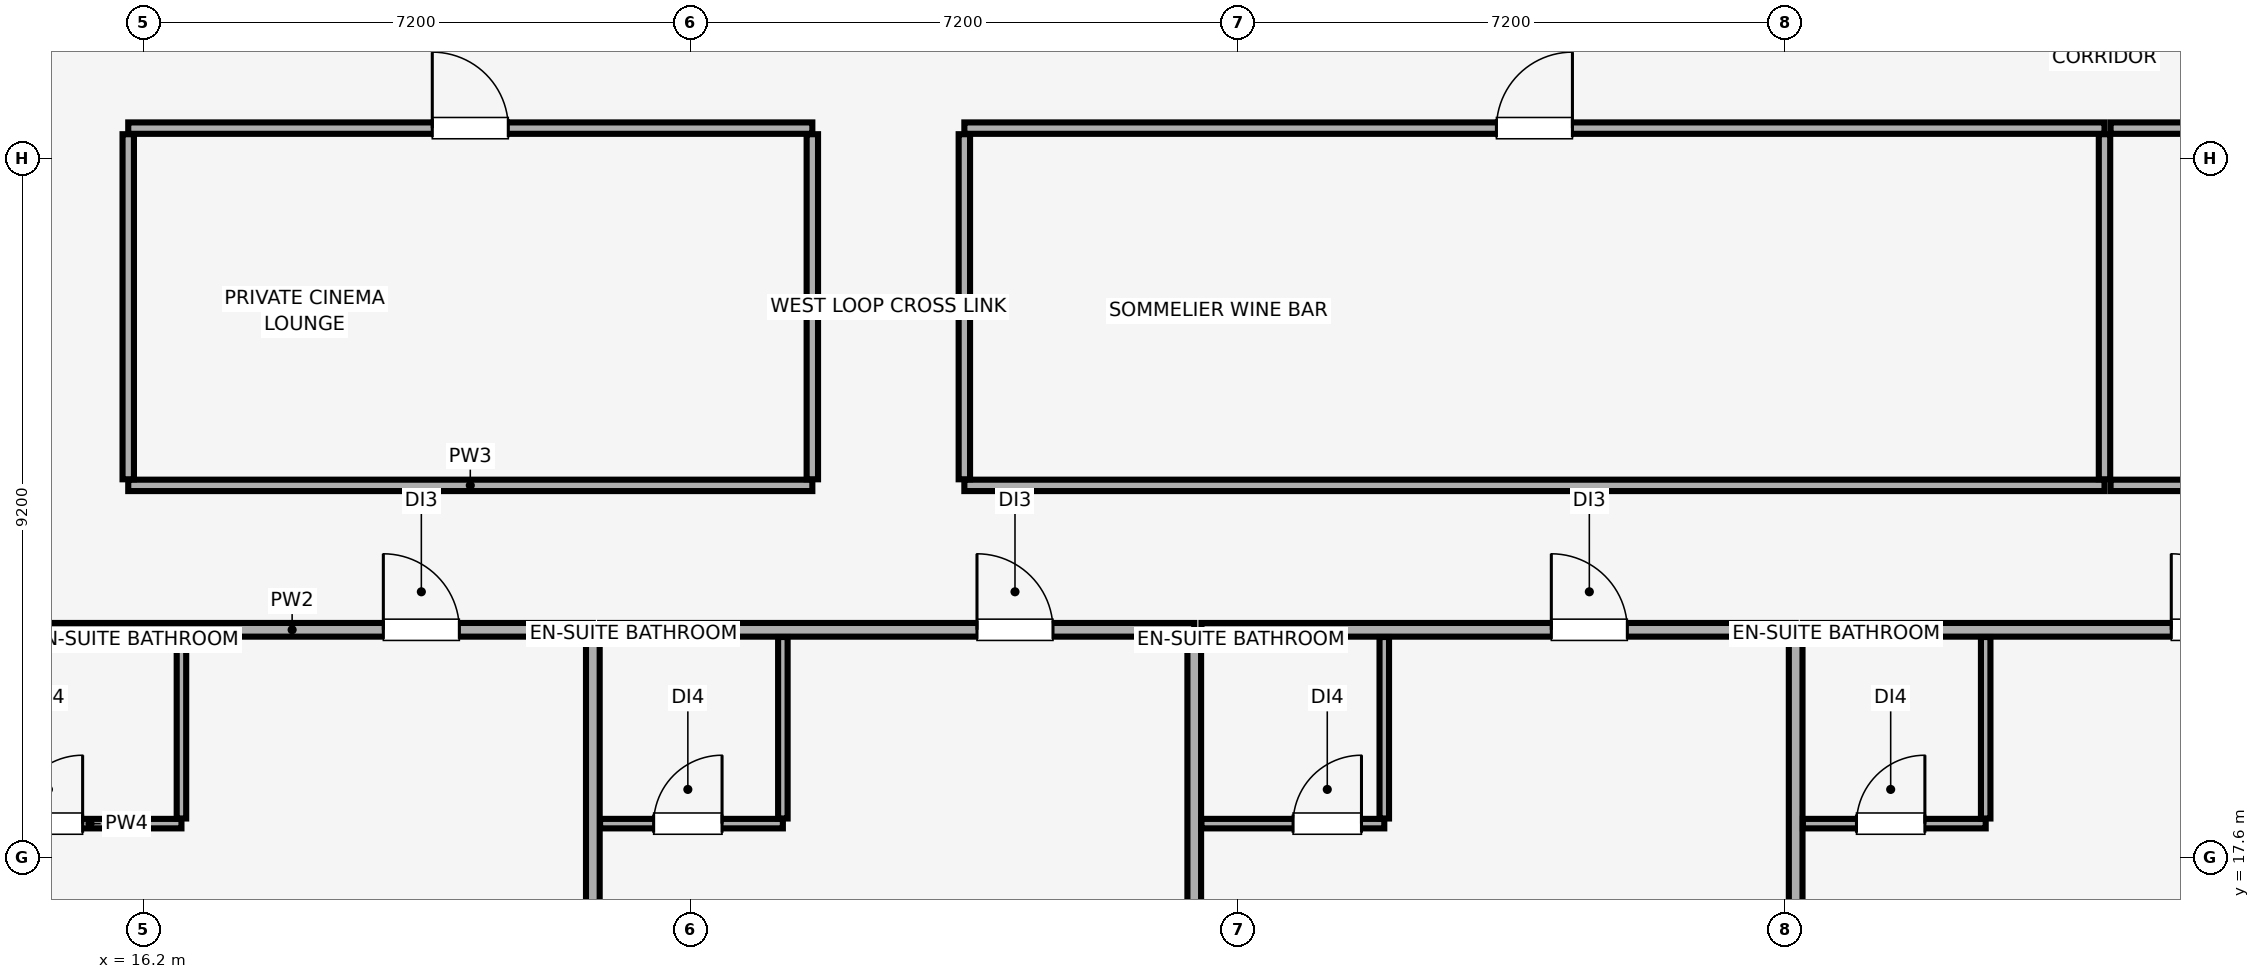
"""IFC4 building model, lengths in metres.
Left out: names, types, materials, properties, quantities, classifications, styles, units other than length and angle.
Written with IfcOpenShell. Run it as: python <this file> out.ifc"""

import sys

from ifc_helpers import new_model, si_unit, direction, frame, frame_2d, origin, place, context, subcontext, project, spatial, rectangle, extrude, element, fill, save


model = new_model("IFC4")
c1 = context("Model", 3, precision=1e-05, world=origin(), true_north=direction((0.0, 1.0)))
c2 = subcontext(c1, "Body", "Model", "MODEL_VIEW")
j1 = project(units=[si_unit("LENGTHUNIT", "METRE"), si_unit("PLANEANGLEUNIT", "RADIAN")], contexts=[c1])
p1 = place(None, origin())
s1 = spatial("IfcSite", under=j1, at=p1, CompositionType="ELEMENT")
p2 = place(p1, origin())
s2 = spatial("IfcBuilding", under=s1, at=p2, CompositionType="ELEMENT")
p3 = place(p2, frame((0.0, 0.0, 180.95)))
s3 = spatial("IfcBuildingStorey", under=s2, at=p3, CompositionType="ELEMENT", Elevation=180.95)
p4 = place(p3, frame((14.2, 20.6, 0.0), z_axis=(0.0, 0.0, 1.0), x_axis=(1.0, 0.0, 0.0)))
e1 = element("IfcWall", 1, at=p4, inside=s3, PredefinedType="PARTITIONING", context=c2, shape_type="SweptSolid", body=[
    extrude(rectangle(XDim=7.912, YDim=0.18, at=frame_2d((3.956, 0.0))), origin(), (0.0, 0.0, 1.0), 3.45),
])
p5 = place(p4, frame((5.156, 0.0, 0.0)))
e2 = element("IfcOpeningElement", 2, at=p5, cuts=e1, PredefinedType="OPENING", context=c2, shape_type="SweptSolid", body=[
    extrude(rectangle(XDim=1.0, YDim=2.15, at=frame_2d((0.5, 1.075))), frame((0.0, 0.1, 0.0), z_axis=(0.0, -1.0, 0.0), x_axis=(1.0, 0.0, 0.0)), (0.0, 0.0, 1.0), 0.2),
])
p6 = place(p3, frame((22.112, 3.15, 0.0), z_axis=(0.0, 0.0, 1.0), x_axis=(0.0, 1.0, 0.0)))
e3 = element("IfcWall", 3, at=p6, inside=s3, PredefinedType="PARTITIONING", context=c2, shape_type="SweptSolid", body=[
    extrude(rectangle(XDim=17.355, YDim=0.18, at=frame_2d((8.677, 0.0))), origin(), (0.0, 0.0, 1.0), 3.45),
])
p7 = place(p3, frame((14.295, 18.05, 0.0), z_axis=(0.0, 0.0, 1.0), x_axis=(1.0, 0.0, 0.0)))
e4 = element("IfcWall", 4, at=p7, inside=s3, PredefinedType="PARTITIONING", context=c2, shape_type="SweptSolid", body=[
    extrude(rectangle(XDim=2.405, YDim=0.125, at=frame_2d((1.203, 0.0))), origin(), (0.0, 0.0, 1.0), 3.45),
])
p8 = place(p7, frame((0.205, 0.0, 0.0)))
e5 = element("IfcOpeningElement", 5, at=p8, cuts=e4, PredefinedType="OPENING", context=c2, shape_type="SweptSolid", body=[
    extrude(rectangle(XDim=0.9, YDim=2.1, at=frame_2d((0.45, 1.05))), frame((0.0, 0.073, 0.0), z_axis=(0.0, -1.0, 0.0), x_axis=(1.0, 0.0, 0.0)), (0.0, 0.0, 1.0), 0.145),
])
p9 = place(p3, frame((16.7, 18.117, 0.0), z_axis=(0.0, 0.0, 1.0), x_axis=(0.0, 1.0, 0.0)))
e6 = element("IfcWall", 6, at=p9, inside=s3, PredefinedType="PARTITIONING", context=c2, shape_type="SweptSolid", body=[
    extrude(rectangle(XDim=2.387, YDim=0.125, at=frame_2d((1.194, 0.0))), origin(), (0.0, 0.0, 1.0), 3.45),
])
p10 = place(p3, frame((22.207, 20.6, 0.0), z_axis=(0.0, 0.0, 1.0), x_axis=(1.0, 0.0, 0.0)))
e7 = element("IfcWall", 7, at=p10, inside=s3, PredefinedType="PARTITIONING", context=c2, shape_type="SweptSolid", body=[
    extrude(rectangle(XDim=7.817, YDim=0.18, at=frame_2d((3.909, 0.0))), origin(), (0.0, 0.0, 1.0), 3.45),
])
p11 = place(p10, frame((4.959, 0.0, 0.0)))
e8 = element("IfcOpeningElement", 8, at=p11, cuts=e7, PredefinedType="OPENING", context=c2, shape_type="SweptSolid", body=[
    extrude(rectangle(XDim=1.0, YDim=2.15, at=frame_2d((0.5, 1.075))), frame((0.0, 0.1, 0.0), z_axis=(0.0, -1.0, 0.0), x_axis=(1.0, 0.0, 0.0)), (0.0, 0.0, 1.0), 0.2),
])
p12 = place(p3, frame((30.025, 3.15, 0.0), z_axis=(0.0, 0.0, 1.0), x_axis=(0.0, 1.0, 0.0)))
e9 = element("IfcWall", 9, at=p12, inside=s3, PredefinedType="PARTITIONING", context=c2, shape_type="SweptSolid", body=[
    extrude(rectangle(XDim=17.355, YDim=0.18, at=frame_2d((8.677, 0.0))), origin(), (0.0, 0.0, 1.0), 3.45),
])
p13 = place(p3, frame((22.207, 18.05, 0.0), z_axis=(0.0, 0.0, 1.0), x_axis=(1.0, 0.0, 0.0)))
e10 = element("IfcWall", 10, at=p13, inside=s3, PredefinedType="PARTITIONING", context=c2, shape_type="SweptSolid", body=[
    extrude(rectangle(XDim=2.405, YDim=0.125, at=frame_2d((1.203, 0.0))), origin(), (0.0, 0.0, 1.0), 3.45),
])
p14 = place(p13, frame((0.705, 0.0, 0.0)))
e11 = element("IfcOpeningElement", 11, at=p14, cuts=e10, PredefinedType="OPENING", context=c2, shape_type="SweptSolid", body=[
    extrude(rectangle(XDim=0.9, YDim=2.1, at=frame_2d((0.45, 1.05))), frame((0.0, 0.073, 0.0), z_axis=(0.0, -1.0, 0.0), x_axis=(1.0, 0.0, 0.0)), (0.0, 0.0, 1.0), 0.145),
])
p15 = place(p3, frame((24.612, 18.117, 0.0), z_axis=(0.0, 0.0, 1.0), x_axis=(0.0, 1.0, 0.0)))
e12 = element("IfcWall", 12, at=p15, inside=s3, PredefinedType="PARTITIONING", context=c2, shape_type="SweptSolid", body=[
    extrude(rectangle(XDim=2.387, YDim=0.125, at=frame_2d((1.194, 0.0))), origin(), (0.0, 0.0, 1.0), 3.45),
])
p16 = place(p3, frame((30.12, 20.6, 0.0), z_axis=(0.0, 0.0, 1.0), x_axis=(1.0, 0.0, 0.0)))
e13 = element("IfcWall", 13, at=p16, inside=s3, PredefinedType="PARTITIONING", context=c2, shape_type="SweptSolid", body=[
    extrude(rectangle(XDim=7.817, YDim=0.18, at=frame_2d((3.909, 0.0))), origin(), (0.0, 0.0, 1.0), 3.45),
])
p17 = place(p16, frame((4.603, 0.0, 0.0)))
e14 = element("IfcOpeningElement", 14, at=p17, cuts=e13, PredefinedType="OPENING", context=c2, shape_type="SweptSolid", body=[
    extrude(rectangle(XDim=1.0, YDim=2.15, at=frame_2d((0.5, 1.075))), frame((0.0, 0.1, 0.0), z_axis=(0.0, -1.0, 0.0), x_axis=(1.0, 0.0, 0.0)), (0.0, 0.0, 1.0), 0.2),
])
p18 = place(p3, frame((37.937, 3.15, 0.0), z_axis=(0.0, 0.0, 1.0), x_axis=(0.0, 1.0, 0.0)))
e15 = element("IfcWall", 15, at=p18, inside=s3, PredefinedType="PARTITIONING", context=c2, shape_type="SweptSolid", body=[
    extrude(rectangle(XDim=17.355, YDim=0.18, at=frame_2d((8.677, 0.0))), origin(), (0.0, 0.0, 1.0), 2.85),
])
p19 = place(p3, frame((30.12, 18.05, 0.0), z_axis=(0.0, 0.0, 1.0), x_axis=(1.0, 0.0, 0.0)))
e16 = element("IfcWall", 16, at=p19, inside=s3, PredefinedType="PARTITIONING", context=c2, shape_type="SweptSolid", body=[
    extrude(rectangle(XDim=2.405, YDim=0.125, at=frame_2d((1.203, 0.0))), origin(), (0.0, 0.0, 1.0), 3.45),
])
p20 = place(p19, frame((1.205, 0.0, 0.0)))
e17 = element("IfcOpeningElement", 17, at=p20, cuts=e16, PredefinedType="OPENING", context=c2, shape_type="SweptSolid", body=[
    extrude(rectangle(XDim=0.9, YDim=2.1, at=frame_2d((0.45, 1.05))), frame((0.0, 0.073, 0.0), z_axis=(0.0, -1.0, 0.0), x_axis=(1.0, 0.0, 0.0)), (0.0, 0.0, 1.0), 0.145),
])
p21 = place(p3, frame((32.525, 18.117, 0.0), z_axis=(0.0, 0.0, 1.0), x_axis=(0.0, 1.0, 0.0)))
e18 = element("IfcWall", 18, at=p21, inside=s3, PredefinedType="PARTITIONING", context=c2, shape_type="SweptSolid", body=[
    extrude(rectangle(XDim=2.387, YDim=0.125, at=frame_2d((1.194, 0.0))), origin(), (0.0, 0.0, 1.0), 3.45),
])
p22 = place(p3, frame((38.032, 20.6, 0.0), z_axis=(0.0, 0.0, 1.0), x_axis=(1.0, 0.0, 0.0)))
e19 = element("IfcWall", 19, at=p22, inside=s3, PredefinedType="PARTITIONING", context=c2, shape_type="SweptSolid", body=[
    extrude(rectangle(XDim=7.817, YDim=0.18, at=frame_2d((3.909, 0.0))), origin(), (0.0, 0.0, 1.0), 3.45),
])
p23 = place(p22, frame((4.847, 0.0, 0.0)))
e20 = element("IfcOpeningElement", 20, at=p23, cuts=e19, PredefinedType="OPENING", context=c2, shape_type="SweptSolid", body=[
    extrude(rectangle(XDim=1.0, YDim=2.15, at=frame_2d((0.5, 1.075))), frame((0.0, 0.1, 0.0), z_axis=(0.0, -1.0, 0.0), x_axis=(1.0, 0.0, 0.0)), (0.0, 0.0, 1.0), 0.2),
])
p24 = place(p3, frame((38.032, 18.05, 0.0), z_axis=(0.0, 0.0, 1.0), x_axis=(1.0, 0.0, 0.0)))
e21 = element("IfcWall", 21, at=p24, inside=s3, PredefinedType="PARTITIONING", context=c2, shape_type="SweptSolid", body=[
    extrude(rectangle(XDim=2.405, YDim=0.125, at=frame_2d((1.203, 0.0))), origin(), (0.0, 0.0, 1.0), 3.45),
])
p25 = place(p24, frame((0.705, 0.0, 0.0)))
e22 = element("IfcOpeningElement", 22, at=p25, cuts=e21, PredefinedType="OPENING", context=c2, shape_type="SweptSolid", body=[
    extrude(rectangle(XDim=0.9, YDim=2.1, at=frame_2d((0.45, 1.05))), frame((0.0, 0.073, 0.0), z_axis=(0.0, -1.0, 0.0), x_axis=(1.0, 0.0, 0.0)), (0.0, 0.0, 1.0), 0.145),
])
p26 = place(p3, frame((40.437, 18.117, 0.0), z_axis=(0.0, 0.0, 1.0), x_axis=(0.0, 1.0, 0.0)))
e23 = element("IfcWall", 23, at=p26, inside=s3, PredefinedType="PARTITIONING", context=c2, shape_type="SweptSolid", body=[
    extrude(rectangle(XDim=2.387, YDim=0.125, at=frame_2d((1.194, 0.0))), origin(), (0.0, 0.0, 1.0), 3.45),
])
p27 = place(p3, frame((16.0, 22.5, 0.0), z_axis=(0.0, 0.0, 1.0), x_axis=(1.0, 0.0, 0.0)))
e24 = element("IfcWall", 24, at=p27, inside=s3, PredefinedType="PARTITIONING", context=c2, shape_type="SweptSolid", body=[
    extrude(rectangle(XDim=9.0, YDim=0.15, at=frame_2d((4.5, 0.0))), origin(), (0.0, 0.0, 1.0), 3.45),
])
p28 = place(p3, frame((16.0, 27.2, 0.0), z_axis=(0.0, 0.0, 1.0), x_axis=(1.0, 0.0, 0.0)))
e25 = element("IfcWall", 25, at=p28, inside=s3, PredefinedType="PARTITIONING", context=c2, shape_type="SweptSolid", body=[
    extrude(rectangle(XDim=9.0, YDim=0.15, at=frame_2d((4.5, 0.0))), origin(), (0.0, 0.0, 1.0), 3.45),
])
p29 = place(p28, frame((4.0, 0.0, 0.0)))
e26 = element("IfcOpeningElement", 26, at=p29, cuts=e25, PredefinedType="OPENING", context=c2, shape_type="SweptSolid", body=[
    extrude(rectangle(XDim=1.0, YDim=2.15, at=frame_2d((0.5, 1.075))), frame((0.0, 0.085, 0.0), z_axis=(0.0, -1.0, 0.0), x_axis=(1.0, 0.0, 0.0)), (0.0, 0.0, 1.0), 0.17),
])
p30 = place(p3, frame((16.0, 22.58, 0.0), z_axis=(0.0, 0.0, 1.0), x_axis=(0.0, 1.0, 0.0)))
e27 = element("IfcWall", 27, at=p30, inside=s3, PredefinedType="PARTITIONING", context=c2, shape_type="SweptSolid", body=[
    extrude(rectangle(XDim=4.54, YDim=0.15, at=frame_2d((2.27, 0.0))), origin(), (0.0, 0.0, 1.0), 2.95),
])
p31 = place(p3, frame((25.0, 22.58, 0.0), z_axis=(0.0, 0.0, 1.0), x_axis=(0.0, 1.0, 0.0)))
e28 = element("IfcWall", 28, at=p31, inside=s3, PredefinedType="PARTITIONING", context=c2, shape_type="SweptSolid", body=[
    extrude(rectangle(XDim=4.54, YDim=0.15, at=frame_2d((2.27, 0.0))), origin(), (0.0, 0.0, 1.0), 3.45),
])
p32 = place(p3, frame((27.0, 22.5, 0.0), z_axis=(0.0, 0.0, 1.0), x_axis=(1.0, 0.0, 0.0)))
e29 = element("IfcWall", 29, at=p32, inside=s3, PredefinedType="PARTITIONING", context=c2, shape_type="SweptSolid", body=[
    extrude(rectangle(XDim=15.0, YDim=0.15, at=frame_2d((7.5, 0.0))), origin(), (0.0, 0.0, 1.0), 3.45),
])
p33 = place(p3, frame((27.0, 27.2, 0.0), z_axis=(0.0, 0.0, 1.0), x_axis=(1.0, 0.0, 0.0)))
e30 = element("IfcWall", 30, at=p33, inside=s3, PredefinedType="PARTITIONING", context=c2, shape_type="SweptSolid", body=[
    extrude(rectangle(XDim=15.0, YDim=0.15, at=frame_2d((7.5, 0.0))), origin(), (0.0, 0.0, 1.0), 3.45),
])
p34 = place(p33, frame((7.0, 0.0, 0.0)))
e31 = element("IfcOpeningElement", 31, at=p34, cuts=e30, PredefinedType="OPENING", context=c2, shape_type="SweptSolid", body=[
    extrude(rectangle(XDim=1.0, YDim=2.15, at=frame_2d((0.5, 1.075))), frame((0.0, 0.085, 0.0), z_axis=(0.0, -1.0, 0.0), x_axis=(1.0, 0.0, 0.0)), (0.0, 0.0, 1.0), 0.17),
])
for number, where, z_axis, x_axis in (
    (32, (27.0, 22.58, 0.0), (0.0, 0.0, 1.0), (0.0, 1.0, 0.0)),
    (33, (42.0, 22.58, 0.0), (0.0, 0.0, 1.0), (0.0, 1.0, 0.0)),
):
    element("IfcWall", number, at=place(p3, frame(where, z_axis=z_axis, x_axis=x_axis)), inside=s3, PredefinedType="PARTITIONING", context=c2, shape_type="SweptSolid", body=[
        extrude(rectangle(XDim=4.54, YDim=0.15, at=frame_2d((2.27, 0.0))), origin(), (0.0, 0.0, 1.0), 2.95),
    ])
p35 = place(p3, frame((42.08, 22.5, 0.0), z_axis=(0.0, 0.0, 1.0), x_axis=(1.0, 0.0, 0.0)))
e34 = element("IfcWall", 34, at=p35, inside=s3, PredefinedType="PARTITIONING", context=c2, shape_type="SweptSolid", body=[
    extrude(rectangle(XDim=14.92, YDim=0.15, at=frame_2d((7.46, 0.0))), origin(), (0.0, 0.0, 1.0), 3.45),
])
p36 = place(p3, frame((42.08, 27.2, 0.0), z_axis=(0.0, 0.0, 1.0), x_axis=(1.0, 0.0, 0.0)))
e35 = element("IfcWall", 35, at=p36, inside=s3, PredefinedType="PARTITIONING", context=c2, shape_type="SweptSolid", body=[
    extrude(rectangle(XDim=14.92, YDim=0.15, at=frame_2d((7.46, 0.0))), origin(), (0.0, 0.0, 1.0), 3.45),
])
p37 = place(p36, frame((6.92, 0.0, 0.0)))
e36 = element("IfcOpeningElement", 36, at=p37, cuts=e35, PredefinedType="OPENING", context=c2, shape_type="SweptSolid", body=[
    extrude(rectangle(XDim=1.0, YDim=2.15, at=frame_2d((0.5, 1.075))), frame((0.0, 0.085, 0.0), z_axis=(0.0, -1.0, 0.0), x_axis=(1.0, 0.0, 0.0)), (0.0, 0.0, 1.0), 0.17),
])
p38 = place(p5, origin())
e37 = element("IfcDoor", 37, at=p38, inside=s3, OperationType="SINGLE_SWING_LEFT", PredefinedType="DOOR", context=c2, shape_type="SweptSolid", body=[
    extrude(rectangle(XDim=1.0, YDim=2.15, at=frame_2d((0.5, 1.075))), frame((0.0, 0.025, 0.0), z_axis=(0.0, -1.0, 0.0), x_axis=(1.0, 0.0, 0.0)), (0.0, 0.0, 1.0), 0.05),
])
fill(e2, e37)
p39 = place(p8, origin())
e38 = element("IfcDoor", 38, at=p39, inside=s3, OperationType="SINGLE_SWING_RIGHT", PredefinedType="DOOR", context=c2, shape_type="SweptSolid", body=[
    extrude(rectangle(XDim=0.9, YDim=2.1, at=frame_2d((0.45, 1.05))), frame((0.0, 0.025, 0.0), z_axis=(0.0, -1.0, 0.0), x_axis=(1.0, 0.0, 0.0)), (0.0, 0.0, 1.0), 0.05),
])
fill(e5, e38)
p40 = place(p11, origin())
e39 = element("IfcDoor", 39, at=p40, inside=s3, OperationType="SINGLE_SWING_LEFT", PredefinedType="DOOR", context=c2, shape_type="SweptSolid", body=[
    extrude(rectangle(XDim=1.0, YDim=2.15, at=frame_2d((0.5, 1.075))), frame((0.0, 0.025, 0.0), z_axis=(0.0, -1.0, 0.0), x_axis=(1.0, 0.0, 0.0)), (0.0, 0.0, 1.0), 0.05),
])
fill(e8, e39)
p41 = place(p14, origin())
e40 = element("IfcDoor", 40, at=p41, inside=s3, OperationType="SINGLE_SWING_RIGHT", PredefinedType="DOOR", context=c2, shape_type="SweptSolid", body=[
    extrude(rectangle(XDim=0.9, YDim=2.1, at=frame_2d((0.45, 1.05))), frame((0.0, 0.025, 0.0), z_axis=(0.0, -1.0, 0.0), x_axis=(1.0, 0.0, 0.0)), (0.0, 0.0, 1.0), 0.05),
])
fill(e11, e40)
p42 = place(p17, origin())
e41 = element("IfcDoor", 41, at=p42, inside=s3, OperationType="SINGLE_SWING_LEFT", PredefinedType="DOOR", context=c2, shape_type="SweptSolid", body=[
    extrude(rectangle(XDim=1.0, YDim=2.15, at=frame_2d((0.5, 1.075))), frame((0.0, 0.025, 0.0), z_axis=(0.0, -1.0, 0.0), x_axis=(1.0, 0.0, 0.0)), (0.0, 0.0, 1.0), 0.05),
])
fill(e14, e41)
p43 = place(p20, origin())
e42 = element("IfcDoor", 42, at=p43, inside=s3, OperationType="SINGLE_SWING_RIGHT", PredefinedType="DOOR", context=c2, shape_type="SweptSolid", body=[
    extrude(rectangle(XDim=0.9, YDim=2.1, at=frame_2d((0.45, 1.05))), frame((0.0, 0.025, 0.0), z_axis=(0.0, -1.0, 0.0), x_axis=(1.0, 0.0, 0.0)), (0.0, 0.0, 1.0), 0.05),
])
fill(e17, e42)
p44 = place(p23, origin())
e43 = element("IfcDoor", 43, at=p44, inside=s3, OperationType="SINGLE_SWING_LEFT", PredefinedType="DOOR", context=c2, shape_type="SweptSolid", body=[
    extrude(rectangle(XDim=1.0, YDim=2.15, at=frame_2d((0.5, 1.075))), frame((0.0, 0.025, 0.0), z_axis=(0.0, -1.0, 0.0), x_axis=(1.0, 0.0, 0.0)), (0.0, 0.0, 1.0), 0.05),
])
fill(e20, e43)
p45 = place(p25, origin())
e44 = element("IfcDoor", 44, at=p45, inside=s3, OperationType="SINGLE_SWING_RIGHT", PredefinedType="DOOR", context=c2, shape_type="SweptSolid", body=[
    extrude(rectangle(XDim=0.9, YDim=2.1, at=frame_2d((0.45, 1.05))), frame((0.0, 0.025, 0.0), z_axis=(0.0, -1.0, 0.0), x_axis=(1.0, 0.0, 0.0)), (0.0, 0.0, 1.0), 0.05),
])
fill(e22, e44)
p46 = place(p29, origin())
e45 = element("IfcDoor", 45, at=p46, inside=s3, OperationType="SINGLE_SWING_LEFT", PredefinedType="DOOR", context=c2, shape_type="SweptSolid", body=[
    extrude(rectangle(XDim=1.0, YDim=2.15, at=frame_2d((0.5, 1.075))), frame((0.0, 0.025, 0.0), z_axis=(0.0, -1.0, 0.0), x_axis=(1.0, 0.0, 0.0)), (0.0, 0.0, 1.0), 0.05),
])
fill(e26, e45)
p47 = place(p34, origin())
e46 = element("IfcDoor", 46, at=p47, inside=s3, OperationType="SINGLE_SWING_RIGHT", PredefinedType="DOOR", context=c2, shape_type="SweptSolid", body=[
    extrude(rectangle(XDim=1.0, YDim=2.15, at=frame_2d((0.5, 1.075))), frame((0.0, 0.025, 0.0), z_axis=(0.0, -1.0, 0.0), x_axis=(1.0, 0.0, 0.0)), (0.0, 0.0, 1.0), 0.05),
])
fill(e31, e46)
save(model, sys.argv[1])
